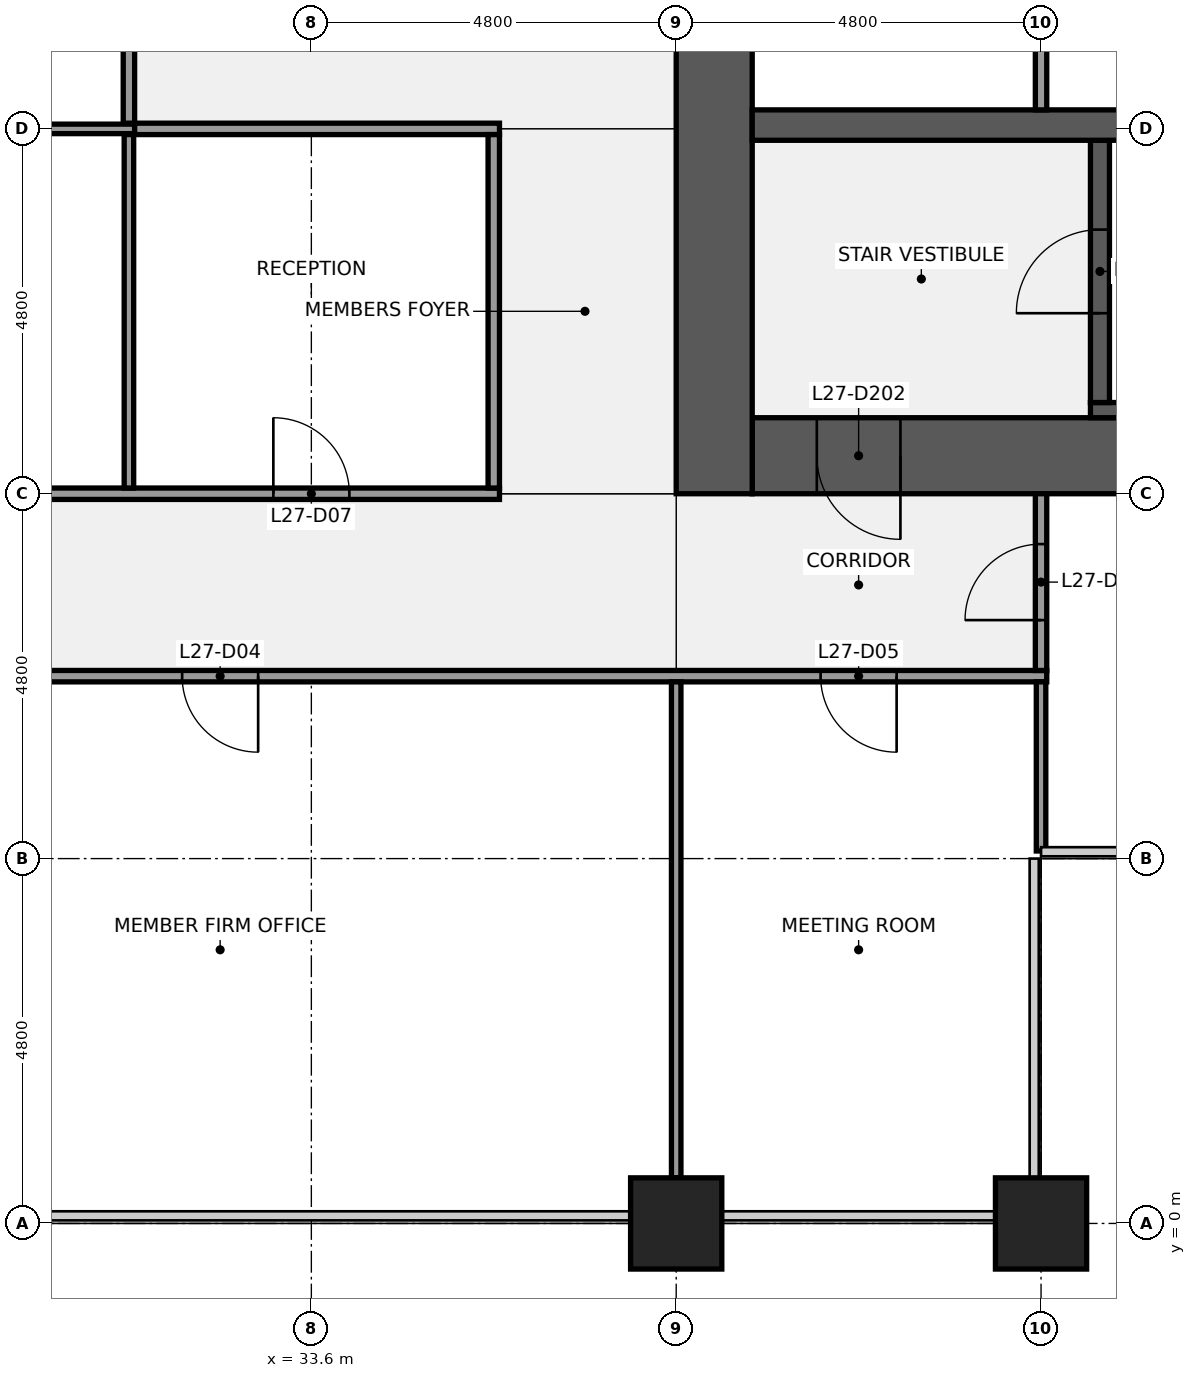
"""IFC4 building model, lengths in metres.
Left out: names, types, materials, properties, quantities, classifications, styles, units other than length and angle.
Written with IfcOpenShell. Run it as: python <this file> out.ifc"""

import sys

from ifc_helpers import new_model, si_unit, direction, frame, frame_2d, origin, origin_2d, place, context, subcontext, project, spatial, rectangle, extrude, element, fill, save


model = new_model("IFC4")
c1 = context("Model", 3, precision=1e-05, world=origin(), true_north=direction((0.0, 1.0)))
c2 = subcontext(c1, "Body", "Model", "MODEL_VIEW")
j1 = project(units=[si_unit("LENGTHUNIT", "METRE"), si_unit("PLANEANGLEUNIT", "RADIAN")], contexts=[c1])
p1 = place(None, origin())
s1 = spatial("IfcSite", under=j1, at=p1, CompositionType="ELEMENT")
p2 = place(p1, origin())
s2 = spatial("IfcBuilding", under=s1, at=p2, CompositionType="ELEMENT")
p3 = place(p2, frame((0.0, 0.0, 128.1)))
s3 = spatial("IfcBuildingStorey", under=s2, at=p3, CompositionType="ELEMENT", Elevation=128.1)
for number, where, z_axis, x_axis in (
    (1, (38.4, 0.0, 0.0), (0.0, 0.0, 1.0), (1.0, 0.0, 0.0)),
    (2, (43.2, 0.0, 0.0), (0.0, 0.0, 1.0), (1.0, 0.0, 0.0)),
):
    element("IfcColumn", number, at=place(p3, frame(where, z_axis=z_axis, x_axis=x_axis)), inside=s3, PredefinedType="COLUMN", context=c2, shape_type="SweptSolid", body=[
        extrude(rectangle(XDim=1.2, YDim=1.2, at=origin_2d()), origin(), (0.0, 0.0, 1.0), 4.0),
    ])
p4 = place(p3, frame((48.0, 10.1, 0.0), z_axis=(0.0, 0.0, 1.0), x_axis=(-1.0, 0.0, 0.0)))
e3 = element("IfcWall", 3, at=p4, inside=s3, PredefinedType="SHEAR", context=c2, shape_type="SweptSolid", body=[
    extrude(rectangle(XDim=8.6, YDim=1.0, at=frame_2d((4.3, 0.0))), origin(), (0.0, 0.0, 1.0), 3.84),
])
p5 = place(p4, frame((6.65, 0.0, 0.0)))
e4 = element("IfcOpeningElement", 4, at=p5, cuts=e3, PredefinedType="OPENING", context=c2, shape_type="SweptSolid", body=[
    extrude(rectangle(XDim=1.1, YDim=2.1, at=frame_2d((0.55, 1.05))), frame((0.0, 0.51, 0.0), z_axis=(0.0, -1.0, 0.0), x_axis=(1.0, 0.0, 0.0)), (0.0, 0.0, 1.0), 1.02),
])
p6 = place(p3, frame((38.9, 9.6, 0.0), z_axis=(0.0, 0.0, 1.0), x_axis=(0.0, 1.0, 0.0)))
e5 = element("IfcWall", 5, at=p6, inside=s3, PredefinedType="SHEAR", context=c2, shape_type="SweptSolid", body=[
    extrude(rectangle(XDim=28.8, YDim=1.0, at=frame_2d((14.4, 0.0))), origin(), (0.0, 0.0, 1.0), 3.84),
])
p7 = place(p6, frame((8.7, 0.0, 0.0)))
e6 = element("IfcOpeningElement", 6, at=p7, cuts=e5, PredefinedType="OPENING", context=c2, shape_type="SweptSolid", body=[
    extrude(rectangle(XDim=1.8, YDim=2.1, at=frame_2d((0.9, 1.05))), frame((0.0, 0.51, 0.0), z_axis=(0.0, -1.0, 0.0), x_axis=(1.0, 0.0, 0.0)), (0.0, 0.0, 1.0), 1.02),
])
p8 = place(p6, frame((18.3, 0.0, 0.0)))
e7 = element("IfcOpeningElement", 7, at=p8, cuts=e5, PredefinedType="OPENING", context=c2, shape_type="SweptSolid", body=[
    extrude(rectangle(XDim=1.8, YDim=2.1, at=frame_2d((0.9, 1.05))), frame((0.0, 0.51, 0.0), z_axis=(0.0, -1.0, 0.0), x_axis=(1.0, 0.0, 0.0)), (0.0, 0.0, 1.0), 1.02),
])
p9 = place(p3, frame((43.85, 10.7, 0.0), z_axis=(0.0, 0.0, 1.0), x_axis=(1.0, 0.0, 0.0)))
e8 = element("IfcWall", 8, at=p9, inside=s3, PredefinedType="SHEAR", context=c2, shape_type="SweptSolid", body=[
    extrude(rectangle(XDim=4.15, YDim=0.2, at=frame_2d((2.075, 0.0))), origin(), (0.0, 0.0, 1.0), 3.84),
])
p10 = place(p3, frame((43.975, 10.8, 0.0), z_axis=(0.0, 0.0, 1.0), x_axis=(0.0, 1.0, 0.0)))
e9 = element("IfcWall", 9, at=p10, inside=s3, PredefinedType="SHEAR", context=c2, shape_type="SweptSolid", body=[
    extrude(rectangle(XDim=3.45, YDim=0.25, at=frame_2d((1.725, 0.0))), origin(), (0.0, 0.0, 1.0), 3.84),
])
p11 = place(p10, frame((1.175, 0.0, 0.0)))
e10 = element("IfcOpeningElement", 10, at=p11, cuts=e9, PredefinedType="OPENING", context=c2, shape_type="SweptSolid", body=[
    extrude(rectangle(XDim=1.1, YDim=2.1, at=frame_2d((0.55, 1.05))), frame((0.0, 0.135, 0.0), z_axis=(0.0, -1.0, 0.0), x_axis=(1.0, 0.0, 0.0)), (0.0, 0.0, 1.0), 0.27),
])
p12 = place(p3, frame((39.4, 14.45, 0.0), z_axis=(0.0, 0.0, 1.0), x_axis=(1.0, 0.0, 0.0)))
e11 = element("IfcWall", 11, at=p12, inside=s3, PredefinedType="SHEAR", context=c2, shape_type="SweptSolid", body=[
    extrude(rectangle(XDim=17.2, YDim=0.4, at=frame_2d((8.6, 0.0))), origin(), (0.0, 0.0, 1.0), 3.84),
])
p13 = place(p3, frame((43.2, 14.65, 0.0), z_axis=(0.0, 0.0, 1.0), x_axis=(0.0, 1.0, 0.0)))
e12 = element("IfcWall", 12, at=p13, inside=s3, PredefinedType="PARTITIONING", context=c2, shape_type="SweptSolid", body=[
    extrude(rectangle(XDim=2.6, YDim=0.15, at=frame_2d((1.3, 0.0))), origin(), (0.0, 0.0, 1.0), 3.84),
])
p14 = place(p3, frame((14.325, 7.2, 0.0), z_axis=(0.0, 0.0, 1.0), x_axis=(1.0, 0.0, 0.0)))
e13 = element("IfcWall", 13, at=p14, inside=s3, PredefinedType="PARTITIONING", context=c2, shape_type="SweptSolid", body=[
    extrude(rectangle(XDim=28.95, YDim=0.15, at=frame_2d((14.475, 0.0))), origin(), (0.0, 0.0, 1.0), 2.936),
])
p15 = place(p14, frame((1.975, 0.0, 0.0)))
e14 = element("IfcOpeningElement", 14, at=p15, cuts=e13, PredefinedType="OPENING", context=c2, shape_type="SweptSolid", body=[
    extrude(rectangle(XDim=1.0, YDim=2.1, at=frame_2d((0.5, 1.05))), frame((0.0, 0.085, 0.0), z_axis=(0.0, -1.0, 0.0), x_axis=(1.0, 0.0, 0.0)), (0.0, 0.0, 1.0), 0.17),
])
p16 = place(p14, frame((5.575, 0.0, 0.0)))
e15 = element("IfcOpeningElement", 15, at=p16, cuts=e13, PredefinedType="OPENING", context=c2, shape_type="SweptSolid", body=[
    extrude(rectangle(XDim=1.0, YDim=2.1, at=frame_2d((0.5, 1.05))), frame((0.0, 0.085, 0.0), z_axis=(0.0, -1.0, 0.0), x_axis=(1.0, 0.0, 0.0)), (0.0, 0.0, 1.0), 0.17),
])
p17 = place(p14, frame((9.175, 0.0, 0.0)))
e16 = element("IfcOpeningElement", 16, at=p17, cuts=e13, PredefinedType="OPENING", context=c2, shape_type="SweptSolid", body=[
    extrude(rectangle(XDim=1.0, YDim=2.1, at=frame_2d((0.5, 1.05))), frame((0.0, 0.085, 0.0), z_axis=(0.0, -1.0, 0.0), x_axis=(1.0, 0.0, 0.0)), (0.0, 0.0, 1.0), 0.17),
])
p18 = place(p14, frame((17.575, 0.0, 0.0)))
e17 = element("IfcOpeningElement", 17, at=p18, cuts=e13, PredefinedType="OPENING", context=c2, shape_type="SweptSolid", body=[
    extrude(rectangle(XDim=1.0, YDim=2.1, at=frame_2d((0.5, 1.05))), frame((0.0, 0.085, 0.0), z_axis=(0.0, -1.0, 0.0), x_axis=(1.0, 0.0, 0.0)), (0.0, 0.0, 1.0), 0.17),
])
p19 = place(p14, frame((25.975, 0.0, 0.0)))
e18 = element("IfcOpeningElement", 18, at=p19, cuts=e13, PredefinedType="OPENING", context=c2, shape_type="SweptSolid", body=[
    extrude(rectangle(XDim=1.0, YDim=2.1, at=frame_2d((0.5, 1.05))), frame((0.0, 0.085, 0.0), z_axis=(0.0, -1.0, 0.0), x_axis=(1.0, 0.0, 0.0)), (0.0, 0.0, 1.0), 0.17),
])
p20 = place(p3, frame((21.525, 9.6, 0.0), z_axis=(0.0, 0.0, 1.0), x_axis=(1.0, 0.0, 0.0)))
e19 = element("IfcWall", 19, at=p20, inside=s3, PredefinedType="PARTITIONING", context=c2, shape_type="SweptSolid", body=[
    extrude(rectangle(XDim=14.55, YDim=0.15, at=frame_2d((7.275, 0.0))), origin(), (0.0, 0.0, 1.0), 2.936),
])
p21 = place(p20, frame((6.775, 0.0, 0.0)))
e20 = element("IfcOpeningElement", 20, at=p21, cuts=e19, PredefinedType="OPENING", context=c2, shape_type="SweptSolid", body=[
    extrude(rectangle(XDim=1.0, YDim=2.1, at=frame_2d((0.5, 1.05))), frame((0.0, 0.085, 0.0), z_axis=(0.0, -1.0, 0.0), x_axis=(1.0, 0.0, 0.0)), (0.0, 0.0, 1.0), 0.17),
])
p22 = place(p20, frame((11.575, 0.0, 0.0)))
e21 = element("IfcOpeningElement", 21, at=p22, cuts=e19, PredefinedType="OPENING", context=c2, shape_type="SweptSolid", body=[
    extrude(rectangle(XDim=1.0, YDim=2.1, at=frame_2d((0.5, 1.05))), frame((0.0, 0.085, 0.0), z_axis=(0.0, -1.0, 0.0), x_axis=(1.0, 0.0, 0.0)), (0.0, 0.0, 1.0), 0.17),
])
p23 = place(p3, frame((26.475, 14.4, 0.0), z_axis=(0.0, 0.0, 1.0), x_axis=(1.0, 0.0, 0.0)))
e22 = element("IfcWall", 22, at=p23, inside=s3, PredefinedType="PARTITIONING", context=c2, shape_type="SweptSolid", body=[
    extrude(rectangle(XDim=4.8, YDim=0.125, at=frame_2d((2.4, 0.0))), origin(), (0.0, 0.0, 1.0), 2.936),
])
p24 = place(p3, frame((31.275, 14.4, 0.0), z_axis=(0.0, 0.0, 1.0), x_axis=(1.0, 0.0, 0.0)))
e23 = element("IfcWall", 23, at=p24, inside=s3, PredefinedType="PARTITIONING", context=c2, shape_type="SweptSolid", body=[
    extrude(rectangle(XDim=4.8, YDim=0.15, at=frame_2d((2.4, 0.0))), origin(), (0.0, 0.0, 1.0), 2.936),
])
p25 = place(p3, frame((31.2, 9.675, 0.0), z_axis=(0.0, 0.0, 1.0), x_axis=(0.0, 1.0, 0.0)))
e24 = element("IfcWall", 24, at=p25, inside=s3, PredefinedType="PARTITIONING", context=c2, shape_type="SweptSolid", body=[
    extrude(rectangle(XDim=4.65, YDim=0.125, at=frame_2d((2.325, 0.0))), origin(), (0.0, 0.0, 1.0), 2.936),
])
p26 = place(p3, frame((31.2, 14.475, 0.0), z_axis=(0.0, 0.0, 1.0), x_axis=(0.0, 1.0, 0.0)))
e25 = element("IfcWall", 25, at=p26, inside=s3, PredefinedType="PARTITIONING", context=c2, shape_type="SweptSolid", body=[
    extrude(rectangle(XDim=10.65, YDim=0.15, at=frame_2d((5.325, 0.0))), origin(), (0.0, 0.0, 1.0), 2.936),
])
p27 = place(p3, frame((36.0, 9.675, 0.0), z_axis=(0.0, 0.0, 1.0), x_axis=(0.0, 1.0, 0.0)))
e26 = element("IfcWall", 26, at=p27, inside=s3, PredefinedType="PARTITIONING", context=c2, shape_type="SweptSolid", body=[
    extrude(rectangle(XDim=4.65, YDim=0.15, at=frame_2d((2.325, 0.0))), origin(), (0.0, 0.0, 1.0), 2.936),
])
p28 = place(p3, frame((38.4, 0.6, 0.0), z_axis=(0.0, 0.0, 1.0), x_axis=(0.0, 1.0, 0.0)))
e27 = element("IfcWall", 27, at=p28, inside=s3, PredefinedType="PARTITIONING", context=c2, shape_type="SweptSolid", body=[
    extrude(rectangle(XDim=6.525, YDim=0.125, at=frame_2d((3.262, 0.0))), origin(), (0.0, 0.0, 1.0), 2.936),
])
p29 = place(p3, frame((43.2, 4.9, 0.0), z_axis=(0.0, 0.0, 1.0), x_axis=(0.0, 1.0, 0.0)))
e28 = element("IfcWall", 28, at=p29, inside=s3, PredefinedType="PARTITIONING", context=c2, shape_type="SweptSolid", body=[
    extrude(rectangle(XDim=2.225, YDim=0.125, at=frame_2d((1.113, 0.0))), origin(), (0.0, 0.0, 1.0), 2.936),
])
p30 = place(p3, frame((43.2, 7.275, 0.0), z_axis=(0.0, 0.0, 1.0), x_axis=(0.0, 1.0, 0.0)))
e29 = element("IfcWall", 29, at=p30, inside=s3, PredefinedType="PARTITIONING", context=c2, shape_type="SweptSolid", body=[
    extrude(rectangle(XDim=2.325, YDim=0.15, at=frame_2d((1.163, 0.0))), origin(), (0.0, 0.0, 1.0), 2.936),
])
p31 = place(p30, frame((0.663, 0.0, 0.0)))
e30 = element("IfcOpeningElement", 30, at=p31, cuts=e29, PredefinedType="OPENING", context=c2, shape_type="SweptSolid", body=[
    extrude(rectangle(XDim=1.0, YDim=2.1, at=frame_2d((0.5, 1.05))), frame((0.0, 0.085, 0.0), z_axis=(0.0, -1.0, 0.0), x_axis=(1.0, 0.0, 0.0)), (0.0, 0.0, 1.0), 0.17),
])
for number, where, z_axis, x_axis in (
    (31, (38.4, -1.05, 0.0), (0.0, 0.0, 1.0), (1.0, 0.0, 0.0)),
    (32, (43.2, -1.05, 0.0), (0.0, 0.0, 1.0), (1.0, 0.0, 0.0)),
):
    element("IfcColumn", number, at=place(p3, frame(where, z_axis=z_axis, x_axis=x_axis)), inside=s3, PredefinedType="PILASTER", context=c2, shape_type="SweptSolid", body=[
        extrude(rectangle(XDim=3.6, YDim=0.9, at=origin_2d()), origin(), (0.0, 0.0, 1.0), 4.0),
    ])
p32 = place(p11, origin())
e33 = element("IfcDoor", 33, at=p32, inside=s3, OperationType="SINGLE_SWING_LEFT", PredefinedType="DOOR", context=c2, shape_type="SweptSolid", body=[
    extrude(rectangle(XDim=1.1, YDim=2.1, at=frame_2d((0.55, 1.05))), frame((0.0, 0.025, 0.0), z_axis=(0.0, -1.0, 0.0), x_axis=(1.0, 0.0, 0.0)), (0.0, 0.0, 1.0), 0.05),
])
fill(e10, e33)
p33 = place(p5, origin())
e34 = element("IfcDoor", 34, at=p33, inside=s3, OperationType="SINGLE_SWING_LEFT", PredefinedType="DOOR", context=c2, shape_type="SweptSolid", body=[
    extrude(rectangle(XDim=1.1, YDim=2.1, at=frame_2d((0.55, 1.05))), frame((0.0, 0.025, 0.0), z_axis=(0.0, -1.0, 0.0), x_axis=(1.0, 0.0, 0.0)), (0.0, 0.0, 1.0), 0.05),
])
fill(e4, e34)
p34 = place(p18, origin())
e35 = element("IfcDoor", 35, at=p34, inside=s3, OperationType="SINGLE_SWING_RIGHT", PredefinedType="DOOR", context=c2, shape_type="SweptSolid", body=[
    extrude(rectangle(XDim=1.0, YDim=2.1, at=frame_2d((0.5, 1.05))), frame((0.0, 0.025, 0.0), z_axis=(0.0, -1.0, 0.0), x_axis=(1.0, 0.0, 0.0)), (0.0, 0.0, 1.0), 0.05),
])
fill(e17, e35)
p35 = place(p19, origin())
e36 = element("IfcDoor", 36, at=p35, inside=s3, OperationType="SINGLE_SWING_RIGHT", PredefinedType="DOOR", context=c2, shape_type="SweptSolid", body=[
    extrude(rectangle(XDim=1.0, YDim=2.1, at=frame_2d((0.5, 1.05))), frame((0.0, 0.025, 0.0), z_axis=(0.0, -1.0, 0.0), x_axis=(1.0, 0.0, 0.0)), (0.0, 0.0, 1.0), 0.05),
])
fill(e18, e36)
p36 = place(p22, origin())
e37 = element("IfcDoor", 37, at=p36, inside=s3, OperationType="SINGLE_SWING_LEFT", PredefinedType="DOOR", context=c2, shape_type="SweptSolid", body=[
    extrude(rectangle(XDim=1.0, YDim=2.1, at=frame_2d((0.5, 1.05))), frame((0.0, 0.025, 0.0), z_axis=(0.0, -1.0, 0.0), x_axis=(1.0, 0.0, 0.0)), (0.0, 0.0, 1.0), 0.05),
])
fill(e21, e37)
p37 = place(p31, origin())
e38 = element("IfcDoor", 38, at=p37, inside=s3, OperationType="SINGLE_SWING_LEFT", PredefinedType="DOOR", context=c2, shape_type="SweptSolid", body=[
    extrude(rectangle(XDim=1.0, YDim=2.1, at=frame_2d((0.5, 1.05))), frame((0.0, 0.025, 0.0), z_axis=(0.0, -1.0, 0.0), x_axis=(1.0, 0.0, 0.0)), (0.0, 0.0, 1.0), 0.05),
])
fill(e30, e38)
save(model, sys.argv[1])
